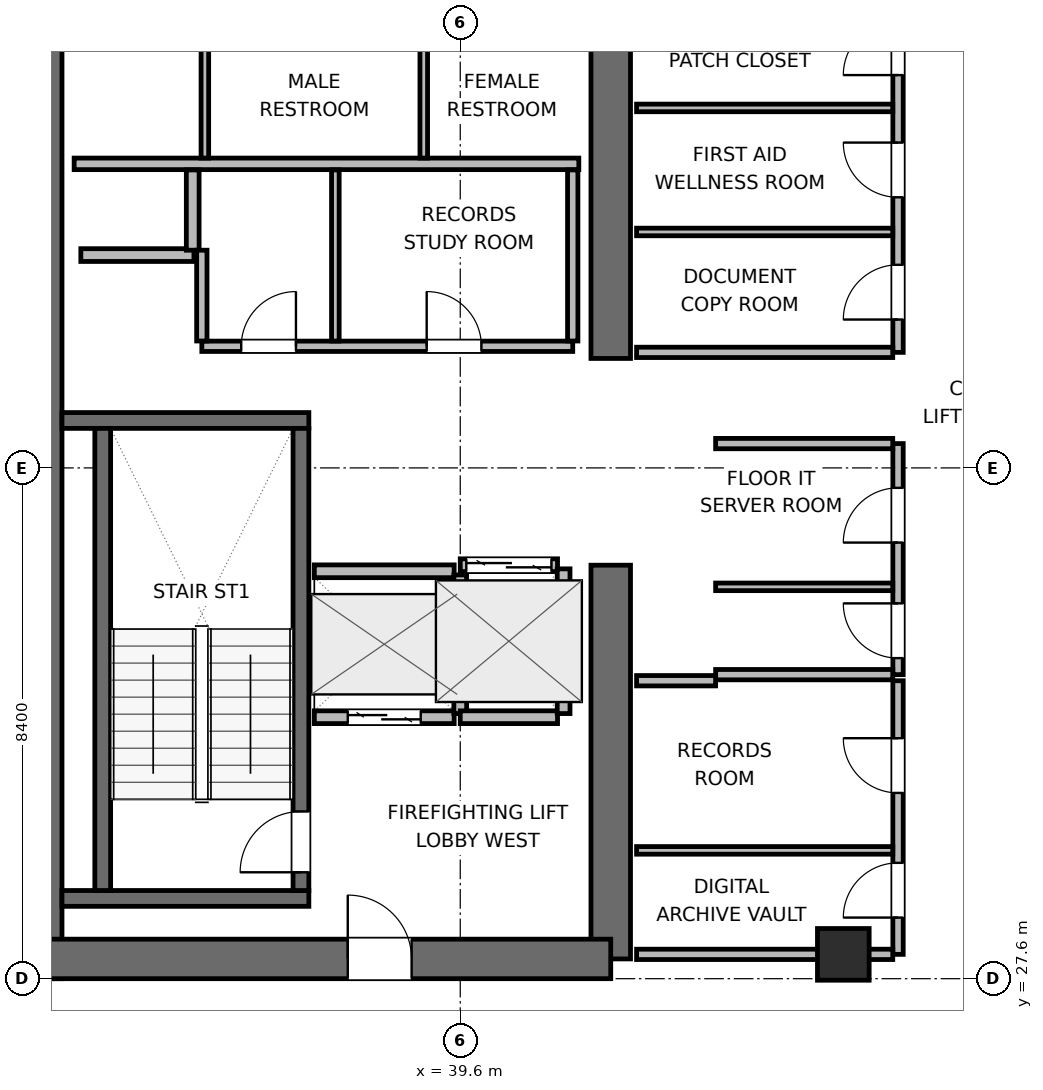
"""IFC4 building model, lengths in metres.
Left out: names, types, materials, properties, quantities, classifications, styles, units other than length and angle.
Written with IfcOpenShell. Run it as: python <this file> out.ifc"""

import sys

from ifc_helpers import new_model, si_unit, direction, frame, frame_2d, origin, origin_2d, place, context, subcontext, project, spatial, rectangle, extrude, element, fill, save


model = new_model("IFC4")
c1 = context("Model", 3, precision=1e-05, world=origin(), true_north=direction((0.0, 1.0)))
c2 = subcontext(c1, "Body", "Model", "MODEL_VIEW")
j1 = project(units=[si_unit("LENGTHUNIT", "METRE"), si_unit("PLANEANGLEUNIT", "RADIAN")], contexts=[c1])
p1 = place(None, origin())
s1 = spatial("IfcSite", under=j1, at=p1, CompositionType="ELEMENT")
p2 = place(p1, origin())
s2 = spatial("IfcBuilding", under=s1, at=p2, CompositionType="ELEMENT")
p3 = place(p2, frame((0.0, 0.0, 223.2)))
s3 = spatial("IfcBuildingStorey", under=s2, at=p3, CompositionType="ELEMENT", Elevation=223.2)
p4 = place(p3, frame((32.725, 27.6, 0.0), z_axis=(0.0, 0.0, 1.0), x_axis=(0.0, 1.0, 0.0)))
e1 = element("IfcWall", 1, at=p4, inside=s3, PredefinedType="SHEAR", context=c2, shape_type="SweptSolid", body=[
    extrude(rectangle(XDim=16.8, YDim=0.65, at=frame_2d((8.4, 0.0))), origin(), (0.0, 0.0, 1.0), 3.9),
])
p5 = place(p3, frame((42.075, 27.925, 0.0), z_axis=(0.0, 0.0, 1.0), x_axis=(0.0, 1.0, 0.0)))
e2 = element("IfcWall", 2, at=p5, inside=s3, PredefinedType="SHEAR", context=c2, shape_type="SweptSolid", body=[
    extrude(rectangle(XDim=6.475, YDim=0.65, at=frame_2d((3.237, 0.0))), origin(), (0.0, 0.0, 1.0), 3.9),
])
p6 = place(p3, frame((42.075, 37.8, 0.0), z_axis=(0.0, 0.0, 1.0), x_axis=(0.0, 1.0, 0.0)))
e3 = element("IfcWall", 3, at=p6, inside=s3, PredefinedType="SHEAR", context=c2, shape_type="SweptSolid", body=[
    extrude(rectangle(XDim=6.275, YDim=0.65, at=frame_2d((3.137, 0.0))), origin(), (0.0, 0.0, 1.0), 3.9),
])
p7 = place(p3, frame((32.725, 27.925, 0.0), z_axis=(0.0, 0.0, 1.0), x_axis=(1.0, 0.0, 0.0)))
e4 = element("IfcWall", 4, at=p7, inside=s3, PredefinedType="SHEAR", context=c2, shape_type="SweptSolid", body=[
    extrude(rectangle(XDim=9.35, YDim=0.65, at=frame_2d((4.675, 0.0))), origin(), (0.0, 0.0, 1.0), 3.9),
])
p8 = place(p7, frame((5.025, 0.0, 0.0)))
e5 = element("IfcOpeningElement", 5, at=p8, cuts=e4, PredefinedType="OPENING", context=c2, shape_type="SweptSolid", body=[
    extrude(rectangle(XDim=1.05, YDim=2.04, at=frame_2d((0.525, 1.02))), frame((0.0, 0.335, 0.0), z_axis=(0.0, -1.0, 0.0), x_axis=(1.0, 0.0, 0.0)), (0.0, 0.0, 1.0), 0.67),
])
for number, where, z_axis, x_axis in (
    (6, (33.05, 28.92, 0.0), (0.0, 0.0, 1.0), (1.0, 0.0, 0.0)),
    (7, (33.05, 36.78, 0.0), (0.0, 0.0, 1.0), (1.0, 0.0, 0.0)),
):
    element("IfcWall", number, at=place(p3, frame(where, z_axis=z_axis, x_axis=x_axis)), inside=s3, PredefinedType="SHEAR", context=c2, shape_type="SweptSolid", body=[
        extrude(rectangle(XDim=4.06, YDim=0.26, at=frame_2d((2.03, 0.0))), origin(), (0.0, 0.0, 1.0), 3.9),
    ])
p9 = place(p3, frame((33.72, 29.05, 0.0), z_axis=(0.0, 0.0, 1.0), x_axis=(0.0, 1.0, 0.0)))
e8 = element("IfcWall", 8, at=p9, inside=s3, PredefinedType="SHEAR", context=c2, shape_type="SweptSolid", body=[
    extrude(rectangle(XDim=7.6, YDim=0.26, at=frame_2d((3.8, 0.0))), origin(), (0.0, 0.0, 1.0), 3.9),
])
p10 = place(p3, frame((36.98, 29.05, 0.0), z_axis=(0.0, 0.0, 1.0), x_axis=(0.0, 1.0, 0.0)))
e9 = element("IfcWall", 9, at=p10, inside=s3, PredefinedType="SHEAR", context=c2, shape_type="SweptSolid", body=[
    extrude(rectangle(XDim=7.6, YDim=0.26, at=frame_2d((3.8, 0.0))), origin(), (0.0, 0.0, 1.0), 3.9),
])
p11 = place(p10, frame((0.3, 0.0, 0.0)))
e10 = element("IfcOpeningElement", 10, at=p11, cuts=e9, PredefinedType="OPENING", context=c2, shape_type="SweptSolid", body=[
    extrude(rectangle(XDim=1.0, YDim=2.04, at=frame_2d((0.5, 1.02))), frame((0.0, 0.14, 0.0), z_axis=(0.0, -1.0, 0.0), x_axis=(1.0, 0.0, 0.0)), (0.0, 0.0, 1.0), 0.28),
])
p12 = place(p3, frame((45.9, 28.0, 0.0), z_axis=(0.0, 0.0, 1.0), x_axis=(1.0, 0.0, 0.0)))
e11 = element("IfcColumn", 11, at=p12, inside=s3, PredefinedType="COLUMN", context=c2, shape_type="SweptSolid", body=[
    extrude(rectangle(XDim=0.85, YDim=0.85, at=origin_2d()), origin(), (0.0, 0.0, 1.0), 3.9),
])
p13 = place(p3, frame((33.25, 41.0, 0.0), z_axis=(0.0, 0.0, 1.0), x_axis=(1.0, 0.0, 0.0)))
e12 = element("IfcWall", 12, at=p13, inside=s3, PredefinedType="PLUMBINGWALL", context=c2, shape_type="SweptSolid", body=[
    extrude(rectangle(XDim=8.3, YDim=0.19, at=frame_2d((4.15, 0.0))), origin(), (0.0, 0.0, 1.0), 3.68),
])
for number, where, z_axis, x_axis in (
    (13, (35.4, 41.095, 0.0), (0.0, 0.0, 1.0), (0.0, 1.0, 0.0)),
    (14, (39.0, 41.095, 0.0), (0.0, 0.0, 1.0), (0.0, 1.0, 0.0)),
):
    element("IfcWall", number, at=place(p3, frame(where, z_axis=z_axis, x_axis=x_axis)), inside=s3, PredefinedType="PARTITIONING", context=c2, shape_type="SweptSolid", body=[
        extrude(rectangle(XDim=2.455, YDim=0.125, at=frame_2d((1.228, 0.0))), origin(), (0.0, 0.0, 1.0), 3.68),
    ])
p14 = place(p3, frame((33.36, 39.5, 0.0), z_axis=(0.0, 0.0, 1.0), x_axis=(1.0, 0.0, 0.0)))
e15 = element("IfcWall", 15, at=p14, inside=s3, PredefinedType="PARTITIONING", context=c2, shape_type="SweptSolid", body=[
    extrude(rectangle(XDim=1.86, YDim=0.21, at=frame_2d((0.93, 0.0))), origin(), (0.0, 0.0, 1.0), 3.68),
])
p15 = place(p3, frame((35.2, 39.58, 0.0), z_axis=(0.0, 0.0, 1.0), x_axis=(0.0, 1.0, 0.0)))
e16 = element("IfcWall", 16, at=p15, inside=s3, PredefinedType="PARTITIONING", context=c2, shape_type="SweptSolid", body=[
    extrude(rectangle(XDim=1.32, YDim=0.21, at=frame_2d((0.66, 0.0))), origin(), (0.0, 0.0, 1.0), 3.68),
])
p16 = place(p3, frame((37.2, 31.9, 0.0), z_axis=(0.0, 0.0, 1.0), x_axis=(1.0, 0.0, 0.0)))
e17 = element("IfcWall", 17, at=p16, inside=s3, PredefinedType="PARTITIONING", context=c2, shape_type="SweptSolid", body=[
    extrude(rectangle(XDim=2.3, YDim=0.21, at=frame_2d((1.15, 0.0))), origin(), (0.0, 0.0, 1.0), 3.68),
])
p17 = place(p16, frame((0.55, 0.0, 0.0)))
e18 = element("IfcOpeningElement", 18, at=p17, cuts=e17, PredefinedType="OPENING", context=c2, shape_type="SweptSolid", body=[
    extrude(rectangle(XDim=1.2, YDim=2.04, at=frame_2d((0.6, 1.02))), frame((0.0, 0.115, 0.0), z_axis=(0.0, -1.0, 0.0), x_axis=(1.0, 0.0, 0.0)), (0.0, 0.0, 1.0), 0.23),
])
p18 = place(p3, frame((37.2, 34.3, 0.0), z_axis=(0.0, 0.0, 1.0), x_axis=(1.0, 0.0, 0.0)))
e19 = element("IfcWall", 19, at=p18, inside=s3, PredefinedType="PARTITIONING", context=c2, shape_type="SweptSolid", body=[
    extrude(rectangle(XDim=2.3, YDim=0.21, at=frame_2d((1.15, 0.0))), origin(), (0.0, 0.0, 1.0), 3.68),
])
p19 = place(p3, frame((39.6, 31.96, 0.0), z_axis=(0.0, 0.0, 1.0), x_axis=(0.0, 1.0, 0.0)))
e20 = element("IfcWall", 20, at=p19, inside=s3, PredefinedType="PARTITIONING", context=c2, shape_type="SweptSolid", body=[
    extrude(rectangle(XDim=2.28, YDim=0.21, at=frame_2d((1.14, 0.0))), origin(), (0.0, 0.0, 1.0), 3.68),
])
p20 = place(p3, frame((39.6, 34.4, 0.0), z_axis=(0.0, 0.0, 1.0), x_axis=(1.0, 0.0, 0.0)))
e21 = element("IfcWall", 21, at=p20, inside=s3, PredefinedType="PARTITIONING", context=c2, shape_type="SweptSolid", body=[
    extrude(rectangle(XDim=1.6, YDim=0.21, at=frame_2d((0.8, 0.0))), origin(), (0.0, 0.0, 1.0), 3.68),
])
p21 = place(p20, frame((0.1, 0.0, 0.0)))
e22 = element("IfcOpeningElement", 22, at=p21, cuts=e21, PredefinedType="OPENING", context=c2, shape_type="SweptSolid", body=[
    extrude(rectangle(XDim=1.4, YDim=2.06, at=frame_2d((0.7, 1.03))), frame((0.0, 0.115, 0.0), z_axis=(0.0, -1.0, 0.0), x_axis=(1.0, 0.0, 0.0)), (0.0, 0.0, 1.0), 0.23),
])
p22 = place(p3, frame((39.6, 31.9, 0.0), z_axis=(0.0, 0.0, 1.0), x_axis=(1.0, 0.0, 0.0)))
e23 = element("IfcWall", 23, at=p22, inside=s3, PredefinedType="PARTITIONING", context=c2, shape_type="SweptSolid", body=[
    extrude(rectangle(XDim=1.6, YDim=0.21, at=frame_2d((0.8, 0.0))), origin(), (0.0, 0.0, 1.0), 3.68),
])
p23 = place(p3, frame((41.3, 31.96, 0.0), z_axis=(0.0, 0.0, 1.0), x_axis=(0.0, 1.0, 0.0)))
e24 = element("IfcWall", 24, at=p23, inside=s3, PredefinedType="PARTITIONING", context=c2, shape_type="SweptSolid", body=[
    extrude(rectangle(XDim=2.38, YDim=0.21, at=frame_2d((1.19, 0.0))), origin(), (0.0, 0.0, 1.0), 3.68),
])
p24 = place(p3, frame((35.35, 38.0, 0.0), z_axis=(0.0, 0.0, 1.0), x_axis=(1.0, 0.0, 0.0)))
e25 = element("IfcWall", 25, at=p24, inside=s3, PredefinedType="PARTITIONING", context=c2, shape_type="SweptSolid", body=[
    extrude(rectangle(XDim=6.1, YDim=0.17, at=frame_2d((3.05, 0.0))), origin(), (0.0, 0.0, 1.0), 3.68),
])
p25 = place(p24, frame((0.648, 0.0, 0.0)))
e26 = element("IfcOpeningElement", 26, at=p25, cuts=e25, PredefinedType="OPENING", context=c2, shape_type="SweptSolid", body=[
    extrude(rectangle(XDim=0.9, YDim=2.02, at=frame_2d((0.45, 1.01))), frame((0.0, 0.095, 0.0), z_axis=(0.0, -1.0, 0.0), x_axis=(1.0, 0.0, 0.0)), (0.0, 0.0, 1.0), 0.19),
])
p26 = place(p24, frame((3.698, 0.0, 0.0)))
e27 = element("IfcOpeningElement", 27, at=p26, cuts=e25, PredefinedType="OPENING", context=c2, shape_type="SweptSolid", body=[
    extrude(rectangle(XDim=0.9, YDim=2.02, at=frame_2d((0.45, 1.01))), frame((0.0, 0.095, 0.0), z_axis=(0.0, -1.0, 0.0), x_axis=(1.0, 0.0, 0.0)), (0.0, 0.0, 1.0), 0.19),
])
p27 = place(p3, frame((35.35, 38.087, 0.0), z_axis=(0.0, 0.0, 1.0), x_axis=(0.0, 1.0, 0.0)))
e28 = element("IfcWall", 28, at=p27, inside=s3, PredefinedType="PARTITIONING", context=c2, shape_type="SweptSolid", body=[
    extrude(rectangle(XDim=1.493, YDim=0.17, at=frame_2d((0.747, 0.0))), origin(), (0.0, 0.0, 1.0), 3.68),
])
p28 = place(p3, frame((41.45, 38.087, 0.0), z_axis=(0.0, 0.0, 1.0), x_axis=(0.0, 1.0, 0.0)))
e29 = element("IfcWall", 29, at=p28, inside=s3, PredefinedType="PARTITIONING", context=c2, shape_type="SweptSolid", body=[
    extrude(rectangle(XDim=2.813, YDim=0.17, at=frame_2d((1.406, 0.0))), origin(), (0.0, 0.0, 1.0), 3.68),
])
p29 = place(p3, frame((37.546, 38.087, 0.0), z_axis=(0.0, 0.0, 1.0), x_axis=(0.0, 1.0, 0.0)))
e30 = element("IfcWall", 30, at=p29, inside=s3, PredefinedType="PARTITIONING", context=c2, shape_type="SweptSolid", body=[
    extrude(rectangle(XDim=2.813, YDim=0.125, at=frame_2d((1.406, 0.0))), origin(), (0.0, 0.0, 1.0), 3.68),
])
p30 = place(p3, frame((46.8, 32.6, 0.0), z_axis=(0.0, 0.0, 1.0), x_axis=(0.0, 1.0, 0.0)))
e31 = element("IfcWall", 31, at=p30, inside=s3, PredefinedType="PARTITIONING", context=c2, shape_type="SweptSolid", body=[
    extrude(rectangle(XDim=3.8, YDim=0.17, at=frame_2d((1.9, 0.0))), origin(), (0.0, 0.0, 1.0), 3.68),
])
p31 = place(p30, frame((0.272, 0.0, 0.0)))
e32 = element("IfcOpeningElement", 32, at=p31, cuts=e31, PredefinedType="OPENING", context=c2, shape_type="SweptSolid", body=[
    extrude(rectangle(XDim=0.9, YDim=2.02, at=frame_2d((0.45, 1.01))), frame((0.0, 0.095, 0.0), z_axis=(0.0, -1.0, 0.0), x_axis=(1.0, 0.0, 0.0)), (0.0, 0.0, 1.0), 0.19),
])
p32 = place(p30, frame((2.172, 0.0, 0.0)))
e33 = element("IfcOpeningElement", 33, at=p32, cuts=e31, PredefinedType="OPENING", context=c2, shape_type="SweptSolid", body=[
    extrude(rectangle(XDim=0.9, YDim=2.02, at=frame_2d((0.45, 1.01))), frame((0.0, 0.095, 0.0), z_axis=(0.0, -1.0, 0.0), x_axis=(1.0, 0.0, 0.0)), (0.0, 0.0, 1.0), 0.19),
])
for number, where, z_axis, x_axis in (
    (34, (43.8, 32.6, 0.0), (0.0, 0.0, 1.0), (1.0, 0.0, 0.0)),
    (35, (43.8, 36.4, 0.0), (0.0, 0.0, 1.0), (1.0, 0.0, 0.0)),
):
    element("IfcWall", number, at=place(p3, frame(where, z_axis=z_axis, x_axis=x_axis)), inside=s3, PredefinedType="PARTITIONING", context=c2, shape_type="SweptSolid", body=[
        extrude(rectangle(XDim=2.913, YDim=0.17, at=frame_2d((1.457, 0.0))), origin(), (0.0, 0.0, 1.0), 3.68),
    ])
p33 = place(p3, frame((43.8, 34.044, 0.0), z_axis=(0.0, 0.0, 1.0), x_axis=(1.0, 0.0, 0.0)))
e36 = element("IfcWall", 36, at=p33, inside=s3, PredefinedType="PARTITIONING", context=c2, shape_type="SweptSolid", body=[
    extrude(rectangle(XDim=2.913, YDim=0.125, at=frame_2d((1.457, 0.0))), origin(), (0.0, 0.0, 1.0), 3.68),
])
p34 = place(p3, frame((46.8, 28.0, 0.0), z_axis=(0.0, 0.0, 1.0), x_axis=(0.0, 1.0, 0.0)))
e37 = element("IfcWall", 37, at=p34, inside=s3, PredefinedType="PARTITIONING", context=c2, shape_type="SweptSolid", body=[
    extrude(rectangle(XDim=4.5, YDim=0.17, at=frame_2d((2.25, 0.0))), origin(), (0.0, 0.0, 1.0), 3.68),
])
p35 = place(p34, frame((0.605, 0.0, 0.0)))
e38 = element("IfcOpeningElement", 38, at=p35, cuts=e37, PredefinedType="OPENING", context=c2, shape_type="SweptSolid", body=[
    extrude(rectangle(XDim=0.9, YDim=2.02, at=frame_2d((0.45, 1.01))), frame((0.0, 0.095, 0.0), z_axis=(0.0, -1.0, 0.0), x_axis=(1.0, 0.0, 0.0)), (0.0, 0.0, 1.0), 0.19),
])
p36 = place(p34, frame((2.655, 0.0, 0.0)))
e39 = element("IfcOpeningElement", 39, at=p36, cuts=e37, PredefinedType="OPENING", context=c2, shape_type="SweptSolid", body=[
    extrude(rectangle(XDim=0.9, YDim=2.02, at=frame_2d((0.45, 1.01))), frame((0.0, 0.095, 0.0), z_axis=(0.0, -1.0, 0.0), x_axis=(1.0, 0.0, 0.0)), (0.0, 0.0, 1.0), 0.19),
])
p37 = place(p3, frame((42.5, 28.0, 0.0), z_axis=(0.0, 0.0, 1.0), x_axis=(1.0, 0.0, 0.0)))
e40 = element("IfcWall", 40, at=p37, inside=s3, PredefinedType="PARTITIONING", context=c2, shape_type="SweptSolid", body=[
    extrude(rectangle(XDim=4.213, YDim=0.17, at=frame_2d((2.106, 0.0))), origin(), (0.0, 0.0, 1.0), 2.765),
])
p38 = place(p3, frame((42.5, 32.5, 0.0), z_axis=(0.0, 0.0, 1.0), x_axis=(1.0, 0.0, 0.0)))
e41 = element("IfcWall", 41, at=p38, inside=s3, PredefinedType="PARTITIONING", context=c2, shape_type="SweptSolid", body=[
    extrude(rectangle(XDim=1.3, YDim=0.17, at=frame_2d((0.65, 0.0))), origin(), (0.0, 0.0, 1.0), 3.68),
])
p39 = place(p3, frame((42.5, 29.71, 0.0), z_axis=(0.0, 0.0, 1.0), x_axis=(1.0, 0.0, 0.0)))
e42 = element("IfcWall", 42, at=p39, inside=s3, PredefinedType="PARTITIONING", context=c2, shape_type="SweptSolid", body=[
    extrude(rectangle(XDim=4.213, YDim=0.125, at=frame_2d((2.106, 0.0))), origin(), (0.0, 0.0, 1.0), 3.68),
])
p40 = place(p3, frame((46.8, 37.9, 0.0), z_axis=(0.0, 0.0, 1.0), x_axis=(0.0, 1.0, 0.0)))
e43 = element("IfcWall", 43, at=p40, inside=s3, PredefinedType="PARTITIONING", context=c2, shape_type="SweptSolid", body=[
    extrude(rectangle(XDim=6.0, YDim=0.17, at=frame_2d((3.0, 0.0))), origin(), (0.0, 0.0, 1.0), 3.68),
])
p41 = place(p40, frame((0.54, 0.0, 0.0)))
e44 = element("IfcOpeningElement", 44, at=p41, cuts=e43, PredefinedType="OPENING", context=c2, shape_type="SweptSolid", body=[
    extrude(rectangle(XDim=0.9, YDim=2.02, at=frame_2d((0.45, 1.01))), frame((0.0, 0.095, 0.0), z_axis=(0.0, -1.0, 0.0), x_axis=(1.0, 0.0, 0.0)), (0.0, 0.0, 1.0), 0.19),
])
p42 = place(p40, frame((2.55, 0.0, 0.0)))
e45 = element("IfcOpeningElement", 45, at=p42, cuts=e43, PredefinedType="OPENING", context=c2, shape_type="SweptSolid", body=[
    extrude(rectangle(XDim=0.9, YDim=2.02, at=frame_2d((0.45, 1.01))), frame((0.0, 0.095, 0.0), z_axis=(0.0, -1.0, 0.0), x_axis=(1.0, 0.0, 0.0)), (0.0, 0.0, 1.0), 0.19),
])
p43 = place(p40, frame((4.56, 0.0, 0.0)))
e46 = element("IfcOpeningElement", 46, at=p43, cuts=e43, PredefinedType="OPENING", context=c2, shape_type="SweptSolid", body=[
    extrude(rectangle(XDim=0.9, YDim=2.02, at=frame_2d((0.45, 1.01))), frame((0.0, 0.095, 0.0), z_axis=(0.0, -1.0, 0.0), x_axis=(1.0, 0.0, 0.0)), (0.0, 0.0, 1.0), 0.19),
])
p44 = place(p3, frame((42.5, 37.9, 0.0), z_axis=(0.0, 0.0, 1.0), x_axis=(1.0, 0.0, 0.0)))
e47 = element("IfcWall", 47, at=p44, inside=s3, PredefinedType="PARTITIONING", context=c2, shape_type="SweptSolid", body=[
    extrude(rectangle(XDim=4.213, YDim=0.17, at=frame_2d((2.106, 0.0))), origin(), (0.0, 0.0, 1.0), 3.68),
])
for number, where, z_axis, x_axis in (
    (48, (42.5, 39.88, 0.0), (0.0, 0.0, 1.0), (1.0, 0.0, 0.0)),
    (49, (42.5, 41.92, 0.0), (0.0, 0.0, 1.0), (1.0, 0.0, 0.0)),
):
    element("IfcWall", number, at=place(p3, frame(where, z_axis=z_axis, x_axis=x_axis)), inside=s3, PredefinedType="PARTITIONING", context=c2, shape_type="SweptSolid", body=[
        extrude(rectangle(XDim=4.213, YDim=0.125, at=frame_2d((2.106, 0.0))), origin(), (0.0, 0.0, 1.0), 3.68),
    ])
p45 = place(p11, origin())
e50 = element("IfcDoor", 50, at=p45, inside=s3, OperationType="SINGLE_SWING_LEFT", PredefinedType="DOOR", context=c2, shape_type="SweptSolid", body=[
    extrude(rectangle(XDim=1.0, YDim=2.04, at=frame_2d((0.5, 1.02))), frame((0.0, 0.025, 0.0), z_axis=(0.0, -1.0, 0.0), x_axis=(1.0, 0.0, 0.0)), (0.0, 0.0, 1.0), 0.05),
])
fill(e10, e50)
p46 = place(p17, origin())
e51 = element("IfcDoor", 51, at=p46, inside=s3, OperationType="DOUBLE_DOOR_SLIDING", PredefinedType="DOOR", context=c2, shape_type="SweptSolid", body=[
    extrude(rectangle(XDim=1.2, YDim=2.04, at=frame_2d((0.6, 1.02))), frame((0.0, 0.025, 0.0), z_axis=(0.0, -1.0, 0.0), x_axis=(1.0, 0.0, 0.0)), (0.0, 0.0, 1.0), 0.05),
])
fill(e18, e51)
p47 = place(p21, origin())
e52 = element("IfcDoor", 52, at=p47, inside=s3, OperationType="DOUBLE_DOOR_SLIDING", PredefinedType="DOOR", context=c2, shape_type="SweptSolid", body=[
    extrude(rectangle(XDim=1.4, YDim=2.06, at=frame_2d((0.7, 1.03))), frame((0.0, 0.025, 0.0), z_axis=(0.0, -1.0, 0.0), x_axis=(1.0, 0.0, 0.0)), (0.0, 0.0, 1.0), 0.05),
])
fill(e22, e52)
p48 = place(p8, origin())
e53 = element("IfcDoor", 53, at=p48, inside=s3, OperationType="SINGLE_SWING_LEFT", PredefinedType="DOOR", context=c2, shape_type="SweptSolid", body=[
    extrude(rectangle(XDim=1.05, YDim=2.04, at=frame_2d((0.525, 1.02))), frame((0.0, 0.025, 0.0), z_axis=(0.0, -1.0, 0.0), x_axis=(1.0, 0.0, 0.0)), (0.0, 0.0, 1.0), 0.05),
])
fill(e5, e53)
p49 = place(p25, origin())
e54 = element("IfcDoor", 54, at=p49, inside=s3, OperationType="SINGLE_SWING_RIGHT", PredefinedType="DOOR", context=c2, shape_type="SweptSolid", body=[
    extrude(rectangle(XDim=0.9, YDim=2.02, at=frame_2d((0.45, 1.01))), frame((0.0, 0.025, 0.0), z_axis=(0.0, -1.0, 0.0), x_axis=(1.0, 0.0, 0.0)), (0.0, 0.0, 1.0), 0.05),
])
fill(e26, e54)
p50 = place(p26, origin())
e55 = element("IfcDoor", 55, at=p50, inside=s3, OperationType="SINGLE_SWING_LEFT", PredefinedType="DOOR", context=c2, shape_type="SweptSolid", body=[
    extrude(rectangle(XDim=0.9, YDim=2.02, at=frame_2d((0.45, 1.01))), frame((0.0, 0.025, 0.0), z_axis=(0.0, -1.0, 0.0), x_axis=(1.0, 0.0, 0.0)), (0.0, 0.0, 1.0), 0.05),
])
fill(e27, e55)
p51 = place(p31, origin())
e56 = element("IfcDoor", 56, at=p51, inside=s3, OperationType="SINGLE_SWING_RIGHT", PredefinedType="DOOR", context=c2, shape_type="SweptSolid", body=[
    extrude(rectangle(XDim=0.9, YDim=2.02, at=frame_2d((0.45, 1.01))), frame((0.0, 0.025, 0.0), z_axis=(0.0, -1.0, 0.0), x_axis=(1.0, 0.0, 0.0)), (0.0, 0.0, 1.0), 0.05),
])
fill(e32, e56)
p52 = place(p32, origin())
e57 = element("IfcDoor", 57, at=p52, inside=s3, OperationType="SINGLE_SWING_LEFT", PredefinedType="DOOR", context=c2, shape_type="SweptSolid", body=[
    extrude(rectangle(XDim=0.9, YDim=2.02, at=frame_2d((0.45, 1.01))), frame((0.0, 0.025, 0.0), z_axis=(0.0, -1.0, 0.0), x_axis=(1.0, 0.0, 0.0)), (0.0, 0.0, 1.0), 0.05),
])
fill(e33, e57)
p53 = place(p35, origin())
e58 = element("IfcDoor", 58, at=p53, inside=s3, OperationType="SINGLE_SWING_LEFT", PredefinedType="DOOR", context=c2, shape_type="SweptSolid", body=[
    extrude(rectangle(XDim=0.9, YDim=2.02, at=frame_2d((0.45, 1.01))), frame((0.0, 0.025, 0.0), z_axis=(0.0, -1.0, 0.0), x_axis=(1.0, 0.0, 0.0)), (0.0, 0.0, 1.0), 0.05),
])
fill(e38, e58)
p54 = place(p36, origin())
e59 = element("IfcDoor", 59, at=p54, inside=s3, OperationType="SINGLE_SWING_RIGHT", PredefinedType="DOOR", context=c2, shape_type="SweptSolid", body=[
    extrude(rectangle(XDim=0.9, YDim=2.02, at=frame_2d((0.45, 1.01))), frame((0.0, 0.025, 0.0), z_axis=(0.0, -1.0, 0.0), x_axis=(1.0, 0.0, 0.0)), (0.0, 0.0, 1.0), 0.05),
])
fill(e39, e59)
p55 = place(p41, origin())
e60 = element("IfcDoor", 60, at=p55, inside=s3, OperationType="SINGLE_SWING_LEFT", PredefinedType="DOOR", context=c2, shape_type="SweptSolid", body=[
    extrude(rectangle(XDim=0.9, YDim=2.02, at=frame_2d((0.45, 1.01))), frame((0.0, 0.025, 0.0), z_axis=(0.0, -1.0, 0.0), x_axis=(1.0, 0.0, 0.0)), (0.0, 0.0, 1.0), 0.05),
])
fill(e44, e60)
p56 = place(p42, origin())
e61 = element("IfcDoor", 61, at=p56, inside=s3, OperationType="SINGLE_SWING_RIGHT", PredefinedType="DOOR", context=c2, shape_type="SweptSolid", body=[
    extrude(rectangle(XDim=0.9, YDim=2.02, at=frame_2d((0.45, 1.01))), frame((0.0, 0.025, 0.0), z_axis=(0.0, -1.0, 0.0), x_axis=(1.0, 0.0, 0.0)), (0.0, 0.0, 1.0), 0.05),
])
fill(e45, e61)
p57 = place(p43, origin())
e62 = element("IfcDoor", 62, at=p57, inside=s3, OperationType="SINGLE_SWING_LEFT", PredefinedType="DOOR", context=c2, shape_type="SweptSolid", body=[
    extrude(rectangle(XDim=0.9, YDim=2.02, at=frame_2d((0.45, 1.01))), frame((0.0, 0.025, 0.0), z_axis=(0.0, -1.0, 0.0), x_axis=(1.0, 0.0, 0.0)), (0.0, 0.0, 1.0), 0.05),
])
fill(e46, e62)
save(model, sys.argv[1])
